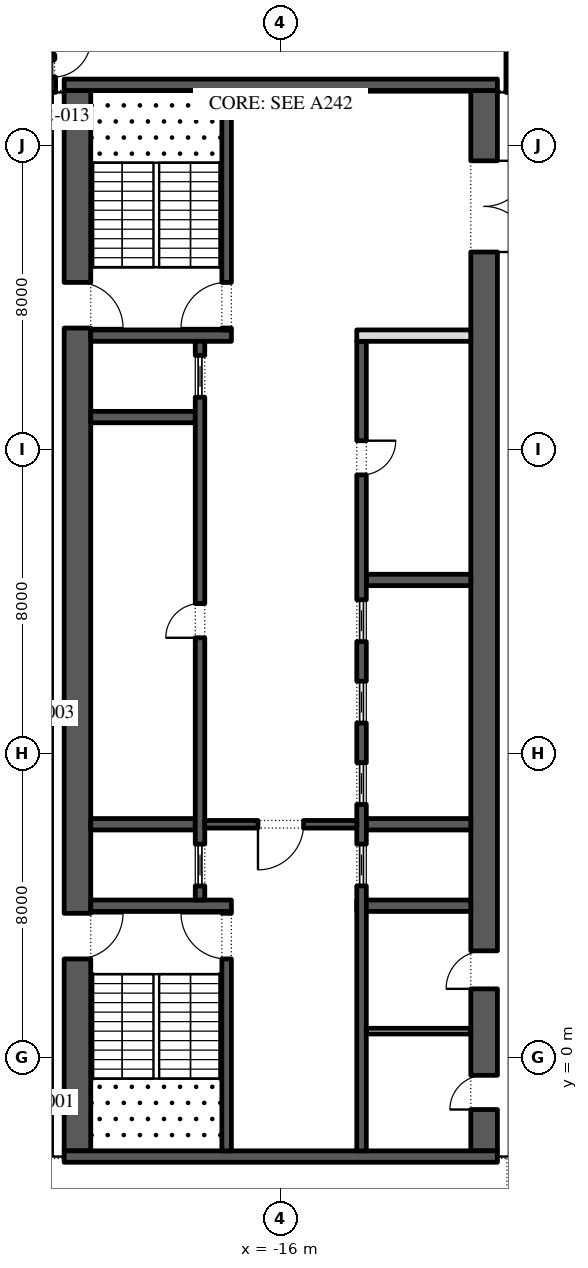
"""IFC4 building model, lengths in metres.
Left out: names, types, materials, properties, quantities, classifications, styles, units other than length and angle.
Written with IfcOpenShell. Run it as: python <this file> out.ifc"""

import sys

from ifc_helpers import new_model, si_unit, direction, frame, frame_2d, origin, place, context, subcontext, project, spatial, rectangle, extrude, element, fill, save


model = new_model("IFC4")
c1 = context("Model", 3, precision=1e-05, world=origin(), true_north=direction((0.0, 1.0)))
c2 = subcontext(c1, "Body", "Model", "MODEL_VIEW")
j1 = project(units=[si_unit("LENGTHUNIT", "METRE"), si_unit("PLANEANGLEUNIT", "RADIAN")], contexts=[c1])
p1 = place(None, origin())
s1 = spatial("IfcSite", under=j1, at=p1, CompositionType="ELEMENT")
p2 = place(p1, origin())
s2 = spatial("IfcBuilding", under=s1, at=p2, CompositionType="ELEMENT")
p3 = place(p2, frame((0.0, 0.0, 180.0)))
s3 = spatial("IfcBuildingStorey", under=s2, at=p3, CompositionType="ELEMENT", Elevation=180.0)
p4 = place(p3, frame((-33.157, 30.092, 0.0), z_axis=(0.0, 0.0, 1.0), x_axis=(0.224950279389, -0.974370243697, 0.0)))
e1 = element("IfcWall", 1, at=p4, inside=s3, PredefinedType="STANDARD", context=c2, shape_type="SweptSolid", body=[
    extrude(rectangle(XDim=49.5, YDim=0.3, at=frame_2d((24.75, 0.0))), origin(), (0.0, 0.0, 1.0), 4.0),
])
p5 = place(p4, frame((2.207, 0.0, 0.0)))
e2 = element("IfcOpeningElement", 2, at=p5, cuts=e1, PredefinedType="OPENING", context=c2, shape_type="SweptSolid", body=[
    extrude(rectangle(XDim=2.4, YDim=3.5, at=frame_2d((1.2, 1.75))), frame((0.0, 0.16, 0.0), z_axis=(0.0, -1.0, 0.0), x_axis=(1.0, 0.0, 0.0)), (0.0, 0.0, 1.0), 0.32),
])
p6 = place(p4, frame((8.121, 0.0, 0.45)))
e3 = element("IfcOpeningElement", 3, at=p6, cuts=e1, PredefinedType="OPENING", context=c2, shape_type="SweptSolid", body=[
    extrude(rectangle(XDim=4.5, YDim=2.825, at=frame_2d((2.25, 1.413))), frame((0.0, 0.16, 0.0), z_axis=(0.0, -1.0, 0.0), x_axis=(1.0, 0.0, 0.0)), (0.0, 0.0, 1.0), 0.32),
])
p7 = place(p4, frame((15.236, 0.0, 0.45)))
e4 = element("IfcOpeningElement", 4, at=p7, cuts=e1, PredefinedType="OPENING", context=c2, shape_type="SweptSolid", body=[
    extrude(rectangle(XDim=4.5, YDim=2.95, at=frame_2d((2.25, 1.475))), frame((0.0, 0.16, 0.0), z_axis=(0.0, -1.0, 0.0), x_axis=(1.0, 0.0, 0.0)), (0.0, 0.0, 1.0), 0.32),
])
p8 = place(p4, frame((22.35, 0.0, 0.45)))
e5 = element("IfcOpeningElement", 5, at=p8, cuts=e1, PredefinedType="OPENING", context=c2, shape_type="SweptSolid", body=[
    extrude(rectangle(XDim=4.5, YDim=3.0, at=frame_2d((2.25, 1.5))), frame((0.0, 0.16, 0.0), z_axis=(0.0, -1.0, 0.0), x_axis=(1.0, 0.0, 0.0)), (0.0, 0.0, 1.0), 0.32),
])
p9 = place(p4, frame((30.514, 0.0, 0.0)))
e6 = element("IfcOpeningElement", 6, at=p9, cuts=e1, PredefinedType="OPENING", context=c2, shape_type="SweptSolid", body=[
    extrude(rectangle(XDim=2.4, YDim=3.5, at=frame_2d((1.2, 1.75))), frame((0.0, 0.16, 0.0), z_axis=(0.0, -1.0, 0.0), x_axis=(1.0, 0.0, 0.0)), (0.0, 0.0, 1.0), 0.32),
])
p10 = place(p4, frame((36.579, 0.0, 0.45)))
e7 = element("IfcOpeningElement", 7, at=p10, cuts=e1, PredefinedType="OPENING", context=c2, shape_type="SweptSolid", body=[
    extrude(rectangle(XDim=4.5, YDim=3.05, at=frame_2d((2.25, 1.525))), frame((0.0, 0.16, 0.0), z_axis=(0.0, -1.0, 0.0), x_axis=(1.0, 0.0, 0.0)), (0.0, 0.0, 1.0), 0.32),
])
p11 = place(p4, frame((43.693, 0.0, 0.45)))
e8 = element("IfcOpeningElement", 8, at=p11, cuts=e1, PredefinedType="OPENING", context=c2, shape_type="SweptSolid", body=[
    extrude(rectangle(XDim=4.5, YDim=3.05, at=frame_2d((2.25, 1.525))), frame((0.0, 0.16, 0.0), z_axis=(0.0, -1.0, 0.0), x_axis=(1.0, 0.0, 0.0)), (0.0, 0.0, 1.0), 0.32),
])
p12 = place(p3, frame((-21.35, -2.45, 0.0), z_axis=(0.0, 0.0, 1.0), x_axis=(0.0, 1.0, 0.0)))
e9 = element("IfcWall", 9, at=p12, inside=s3, PredefinedType="SHEAR", context=c2, shape_type="SweptSolid", body=[
    extrude(rectangle(XDim=27.9, YDim=0.7, at=frame_2d((13.95, 0.0))), origin(), (0.0, 0.0, 1.0), 4.0),
])
p13 = place(p12, frame((5.05, 0.0, 0.0)))
e10 = element("IfcOpeningElement", 10, at=p13, cuts=e9, PredefinedType="OPENING", context=c2, shape_type="SweptSolid", body=[
    extrude(rectangle(XDim=1.2, YDim=2.1, at=frame_2d((0.6, 1.05))), frame((0.0, 0.36, 0.0), z_axis=(0.0, -1.0, 0.0), x_axis=(1.0, 0.0, 0.0)), (0.0, 0.0, 1.0), 0.72),
])
p14 = place(p12, frame((21.65, 0.0, 0.0)))
e11 = element("IfcOpeningElement", 11, at=p14, cuts=e9, PredefinedType="OPENING", context=c2, shape_type="SweptSolid", body=[
    extrude(rectangle(XDim=1.2, YDim=2.1, at=frame_2d((0.6, 1.05))), frame((0.0, 0.36, 0.0), z_axis=(0.0, -1.0, 0.0), x_axis=(1.0, 0.0, 0.0)), (0.0, 0.0, 1.0), 0.72),
])
p15 = place(p3, frame((-10.65, -2.45, 0.0), z_axis=(0.0, 0.0, 1.0), x_axis=(0.0, 1.0, 0.0)))
e12 = element("IfcWall", 12, at=p15, inside=s3, PredefinedType="SHEAR", context=c2, shape_type="SweptSolid", body=[
    extrude(rectangle(XDim=27.9, YDim=0.7, at=frame_2d((13.95, 0.0))), origin(), (0.0, 0.0, 1.0), 4.0),
])
p16 = place(p15, frame((23.65, 0.0, 0.0)))
e13 = element("IfcOpeningElement", 13, at=p16, cuts=e12, PredefinedType="OPENING", context=c2, shape_type="SweptSolid", body=[
    extrude(rectangle(XDim=2.4, YDim=2.1, at=frame_2d((1.2, 1.05))), frame((0.0, 0.36, 0.0), z_axis=(0.0, -1.0, 0.0), x_axis=(1.0, 0.0, 0.0)), (0.0, 0.0, 1.0), 0.72),
])
p17 = place(p15, frame((1.087, 0.0, 0.0)))
e14 = element("IfcOpeningElement", 14, at=p17, cuts=e12, PredefinedType="OPENING", context=c2, shape_type="SweptSolid", body=[
    extrude(rectangle(XDim=0.9, YDim=2.1, at=frame_2d((0.45, 1.05))), frame((0.0, 0.36, 0.0), z_axis=(0.0, -1.0, 0.0), x_axis=(1.0, 0.0, 0.0)), (0.0, 0.0, 1.0), 0.72),
])
p18 = place(p15, frame((4.262, 0.0, 0.0)))
e15 = element("IfcOpeningElement", 15, at=p18, cuts=e12, PredefinedType="OPENING", context=c2, shape_type="SweptSolid", body=[
    extrude(rectangle(XDim=1.0, YDim=2.1, at=frame_2d((0.5, 1.05))), frame((0.0, 0.36, 0.0), z_axis=(0.0, -1.0, 0.0), x_axis=(1.0, 0.0, 0.0)), (0.0, 0.0, 1.0), 0.72),
])
for number, where, z_axis, x_axis in (
    (16, (-21.7, -2.6, 0.0), (0.0, 0.0, 1.0), (1.0, 0.0, 0.0)),
    (17, (-21.7, 25.6, 0.0), (0.0, 0.0, 1.0), (1.0, 0.0, 0.0)),
):
    element("IfcWall", number, at=place(p3, frame(where, z_axis=z_axis, x_axis=x_axis)), inside=s3, PredefinedType="SHEAR", context=c2, shape_type="SweptSolid", body=[
        extrude(rectangle(XDim=11.4, YDim=0.3, at=frame_2d((5.7, 0.0))), origin(), (0.0, 0.0, 1.0), 4.0),
    ])
p19 = place(p3, frame((-21.0, 4.0, 0.0), z_axis=(0.0, 0.0, 1.0), x_axis=(1.0, 0.0, 0.0)))
e18 = element("IfcWall", 18, at=p19, inside=s3, PredefinedType="SHEAR", context=c2, shape_type="SweptSolid", body=[
    extrude(rectangle(XDim=3.7, YDim=0.3, at=frame_2d((1.85, 0.0))), origin(), (0.0, 0.0, 1.0), 4.0),
])
p20 = place(p3, frame((-17.425, -2.45, 0.0), z_axis=(0.0, 0.0, 1.0), x_axis=(0.0, 1.0, 0.0)))
e19 = element("IfcWall", 19, at=p20, inside=s3, PredefinedType="SHEAR", context=c2, shape_type="SweptSolid", body=[
    extrude(rectangle(XDim=6.3, YDim=0.25, at=frame_2d((3.15, 0.0))), origin(), (0.0, 0.0, 1.0), 4.0),
])
p21 = place(p20, frame((5.05, 0.0, 0.0)))
e20 = element("IfcOpeningElement", 20, at=p21, cuts=e19, PredefinedType="OPENING", context=c2, shape_type="SweptSolid", body=[
    extrude(rectangle(XDim=1.2, YDim=2.1, at=frame_2d((0.6, 1.05))), frame((0.0, 0.135, 0.0), z_axis=(0.0, -1.0, 0.0), x_axis=(1.0, 0.0, 0.0)), (0.0, 0.0, 1.0), 0.27),
])
p22 = place(p3, frame((-21.0, 19.0, 0.0), z_axis=(0.0, 0.0, 1.0), x_axis=(1.0, 0.0, 0.0)))
e21 = element("IfcWall", 21, at=p22, inside=s3, PredefinedType="SHEAR", context=c2, shape_type="SweptSolid", body=[
    extrude(rectangle(XDim=3.7, YDim=0.3, at=frame_2d((1.85, 0.0))), origin(), (0.0, 0.0, 1.0), 4.0),
])
p23 = place(p3, frame((-17.425, 19.15, 0.0), z_axis=(0.0, 0.0, 1.0), x_axis=(0.0, 1.0, 0.0)))
e22 = element("IfcWall", 22, at=p23, inside=s3, PredefinedType="SHEAR", context=c2, shape_type="SweptSolid", body=[
    extrude(rectangle(XDim=6.3, YDim=0.25, at=frame_2d((3.15, 0.0))), origin(), (0.0, 0.0, 1.0), 4.0),
])
p24 = place(p23, frame((0.05, 0.0, 0.0)))
e23 = element("IfcOpeningElement", 23, at=p24, cuts=e22, PredefinedType="OPENING", context=c2, shape_type="SweptSolid", body=[
    extrude(rectangle(XDim=1.2, YDim=2.1, at=frame_2d((0.6, 1.05))), frame((0.0, 0.135, 0.0), z_axis=(0.0, -1.0, 0.0), x_axis=(1.0, 0.0, 0.0)), (0.0, 0.0, 1.0), 0.27),
])
for number, where, z_axis, x_axis in (
    (24, (-21.0, 6.143, 0.0), (0.0, 0.0, 1.0), (1.0, 0.0, 0.0)),
    (25, (-21.0, 16.857, 0.0), (0.0, 0.0, 1.0), (1.0, 0.0, 0.0)),
):
    element("IfcWall", number, at=place(p3, frame(where, z_axis=z_axis, x_axis=x_axis)), inside=s3, PredefinedType="SHEAR", context=c2, shape_type="SweptSolid", body=[
        extrude(rectangle(XDim=2.75, YDim=0.3, at=frame_2d((1.375, 0.0))), origin(), (0.0, 0.0, 1.0), 4.0),
    ])
p25 = place(p3, frame((-18.125, 4.15, 0.0), z_axis=(0.0, 0.0, 1.0), x_axis=(0.0, 1.0, 0.0)))
e26 = element("IfcWall", 26, at=p25, inside=s3, PredefinedType="SHEAR", context=c2, shape_type="SweptSolid", body=[
    extrude(rectangle(XDim=14.7, YDim=0.25, at=frame_2d((7.35, 0.0))), origin(), (0.0, 0.0, 1.0), 4.0),
])
p26 = place(p25, frame((6.9, 0.0, 0.0)))
e27 = element("IfcOpeningElement", 27, at=p26, cuts=e26, PredefinedType="OPENING", context=c2, shape_type="SweptSolid", body=[
    extrude(rectangle(XDim=0.9, YDim=2.1, at=frame_2d((0.45, 1.05))), frame((0.0, 0.135, 0.0), z_axis=(0.0, -1.0, 0.0), x_axis=(1.0, 0.0, 0.0)), (0.0, 0.0, 1.0), 0.27),
])
p27 = place(p25, frame((0.371, 0.0, 0.0)))
e28 = element("IfcOpeningElement", 28, at=p27, cuts=e26, PredefinedType="OPENING", context=c2, shape_type="SweptSolid", body=[
    extrude(rectangle(XDim=1.1, YDim=2.1, at=frame_2d((0.55, 1.05))), frame((0.0, 0.135, 0.0), z_axis=(0.0, -1.0, 0.0), x_axis=(1.0, 0.0, 0.0)), (0.0, 0.0, 1.0), 0.27),
])
p28 = place(p25, frame((13.229, 0.0, 0.0)))
e29 = element("IfcOpeningElement", 29, at=p28, cuts=e26, PredefinedType="OPENING", context=c2, shape_type="SweptSolid", body=[
    extrude(rectangle(XDim=1.1, YDim=2.1, at=frame_2d((0.55, 1.05))), frame((0.0, 0.135, 0.0), z_axis=(0.0, -1.0, 0.0), x_axis=(1.0, 0.0, 0.0)), (0.0, 0.0, 1.0), 0.27),
])
p29 = place(p3, frame((-14.0, 4.0, 0.0), z_axis=(0.0, 0.0, 1.0), x_axis=(1.0, 0.0, 0.0)))
e30 = element("IfcWall", 30, at=p29, inside=s3, PredefinedType="SHEAR", context=c2, shape_type="SweptSolid", body=[
    extrude(rectangle(XDim=3.0, YDim=0.3, at=frame_2d((1.5, 0.0))), origin(), (0.0, 0.0, 1.0), 4.0),
])
for number, where, z_axis, x_axis in (
    (31, (-13.75, 6.143, 0.0), (0.0, 0.0, 1.0), (1.0, 0.0, 0.0)),
    (32, (-13.75, 12.571, 0.0), (0.0, 0.0, 1.0), (1.0, 0.0, 0.0)),
):
    element("IfcWall", number, at=place(p3, frame(where, z_axis=z_axis, x_axis=x_axis)), inside=s3, PredefinedType="SHEAR", context=c2, shape_type="SweptSolid", body=[
        extrude(rectangle(XDim=2.75, YDim=0.3, at=frame_2d((1.375, 0.0))), origin(), (0.0, 0.0, 1.0), 4.0),
    ])
p30 = place(p3, frame((-13.875, -2.45, 0.0), z_axis=(0.0, 0.0, 1.0), x_axis=(0.0, 1.0, 0.0)))
e33 = element("IfcWall", 33, at=p30, inside=s3, PredefinedType="SHEAR", context=c2, shape_type="SweptSolid", body=[
    extrude(rectangle(XDim=21.3, YDim=0.25, at=frame_2d((10.65, 0.0))), origin(), (0.0, 0.0, 1.0), 4.0),
])
p31 = place(p30, frame((17.786, 0.0, 0.0)))
e34 = element("IfcOpeningElement", 34, at=p31, cuts=e33, PredefinedType="OPENING", context=c2, shape_type="SweptSolid", body=[
    extrude(rectangle(XDim=0.9, YDim=2.1, at=frame_2d((0.45, 1.05))), frame((0.0, 0.135, 0.0), z_axis=(0.0, -1.0, 0.0), x_axis=(1.0, 0.0, 0.0)), (0.0, 0.0, 1.0), 0.27),
])
p32 = place(p30, frame((6.971, 0.0, 0.0)))
e35 = element("IfcOpeningElement", 35, at=p32, cuts=e33, PredefinedType="OPENING", context=c2, shape_type="SweptSolid", body=[
    extrude(rectangle(XDim=1.1, YDim=2.1, at=frame_2d((0.55, 1.05))), frame((0.0, 0.135, 0.0), z_axis=(0.0, -1.0, 0.0), x_axis=(1.0, 0.0, 0.0)), (0.0, 0.0, 1.0), 0.27),
])
p33 = place(p30, frame((9.114, 0.0, 0.0)))
e36 = element("IfcOpeningElement", 36, at=p33, cuts=e33, PredefinedType="OPENING", context=c2, shape_type="SweptSolid", body=[
    extrude(rectangle(XDim=1.1, YDim=2.1, at=frame_2d((0.55, 1.05))), frame((0.0, 0.135, 0.0), z_axis=(0.0, -1.0, 0.0), x_axis=(1.0, 0.0, 0.0)), (0.0, 0.0, 1.0), 0.27),
])
p34 = place(p30, frame((11.257, 0.0, 0.0)))
e37 = element("IfcOpeningElement", 37, at=p34, cuts=e33, PredefinedType="OPENING", context=c2, shape_type="SweptSolid", body=[
    extrude(rectangle(XDim=1.1, YDim=2.1, at=frame_2d((0.55, 1.05))), frame((0.0, 0.135, 0.0), z_axis=(0.0, -1.0, 0.0), x_axis=(1.0, 0.0, 0.0)), (0.0, 0.0, 1.0), 0.27),
])
p35 = place(p30, frame((13.4, 0.0, 0.0)))
e38 = element("IfcOpeningElement", 38, at=p35, cuts=e33, PredefinedType="OPENING", context=c2, shape_type="SweptSolid", body=[
    extrude(rectangle(XDim=1.1, YDim=2.1, at=frame_2d((0.55, 1.05))), frame((0.0, 0.135, 0.0), z_axis=(0.0, -1.0, 0.0), x_axis=(1.0, 0.0, 0.0)), (0.0, 0.0, 1.0), 0.27),
])
p36 = place(p3, frame((-14.0, 19.0, 0.0), z_axis=(0.0, 0.0, 1.0), x_axis=(1.0, 0.0, 0.0)))
e39 = element("IfcWall", 39, at=p36, inside=s3, PredefinedType="PARTITIONING", context=c2, shape_type="SweptSolid", body=[
    extrude(rectangle(XDim=3.0, YDim=0.3, at=frame_2d((1.5, 0.0))), origin(), (0.0, 0.0, 1.0), 4.0),
])
p37 = place(p3, frame((-18.0, 6.143, 0.0), z_axis=(0.0, 0.0, 1.0), x_axis=(1.0, 0.0, 0.0)))
e40 = element("IfcWall", 40, at=p37, inside=s3, PredefinedType="SHEAR", context=c2, shape_type="SweptSolid", body=[
    extrude(rectangle(XDim=4.0, YDim=0.2, at=frame_2d((2.0, 0.0))), origin(), (0.0, 0.0, 1.0), 4.0),
])
p38 = place(p37, frame((1.4, 0.0, 0.0)))
e41 = element("IfcOpeningElement", 41, at=p38, cuts=e40, PredefinedType="OPENING", context=c2, shape_type="SweptSolid", body=[
    extrude(rectangle(XDim=1.2, YDim=2.1, at=frame_2d((0.6, 1.05))), frame((0.0, 0.11, 0.0), z_axis=(0.0, -1.0, 0.0), x_axis=(1.0, 0.0, 0.0)), (0.0, 0.0, 1.0), 0.22),
])
p39 = place(p3, frame((-13.75, 0.7, 0.0), z_axis=(0.0, 0.0, 1.0), x_axis=(1.0, 0.0, 0.0)))
e42 = element("IfcWall", 42, at=p39, inside=s3, PredefinedType="PARTITIONING", context=c2, shape_type="SweptSolid", body=[
    extrude(rectangle(XDim=2.75, YDim=0.15, at=frame_2d((1.375, 0.0))), origin(), (0.0, 0.0, 1.0), 4.0),
])
p40 = place(p3, frame((-22.0, 27.325, 0.0), z_axis=(0.0, 0.0, 1.0), x_axis=(0.0, -1.0, 0.0)))
e43 = element("IfcWall", 43, at=p40, inside=s3, PredefinedType="PARTITIONING", context=c2, shape_type="SweptSolid", body=[
    extrude(rectangle(XDim=1.925, YDim=0.15, at=frame_2d((0.962, 0.0))), origin(), (0.0, 0.0, 1.0), 4.0),
])
p41 = place(p40, frame((0.525, 0.0, 0.0)))
e44 = element("IfcOpeningElement", 44, at=p41, cuts=e43, PredefinedType="OPENING", context=c2, shape_type="SweptSolid", body=[
    extrude(rectangle(XDim=1.0, YDim=2.1, at=frame_2d((0.5, 1.05))), frame((0.0, 0.085, 0.0), z_axis=(0.0, -1.0, 0.0), x_axis=(1.0, 0.0, 0.0)), (0.0, 0.0, 1.0), 0.17),
])
p42 = place(p3, frame((-10.0, 25.4, 0.0), z_axis=(0.0, 0.0, 1.0), x_axis=(0.0, 1.0, 0.0)))
e45 = element("IfcWall", 45, at=p42, inside=s3, PredefinedType="PARTITIONING", context=c2, shape_type="SweptSolid", body=[
    extrude(rectangle(XDim=2.0, YDim=0.15, at=frame_2d((1.0, 0.0))), origin(), (0.0, 0.0, 1.0), 4.0),
])
p43 = place(p26, origin())
e46 = element("IfcDoor", 46, at=p43, inside=s3, OperationType="SINGLE_SWING_RIGHT", PredefinedType="DOOR", context=c2, shape_type="SweptSolid", body=[
    extrude(rectangle(XDim=0.9, YDim=2.1, at=frame_2d((0.45, 1.05))), frame((0.0, 0.125, 0.0), z_axis=(0.0, -1.0, 0.0), x_axis=(1.0, 0.0, 0.0)), (0.0, 0.0, 1.0), 0.05),
])
fill(e27, e46)
p44 = place(p27, origin())
e47 = element("IfcDoor", 47, at=p44, inside=s3, OperationType="SLIDING_TO_LEFT", PredefinedType="DOOR", context=c2, shape_type="SweptSolid", body=[
    extrude(rectangle(XDim=1.1, YDim=2.1, at=frame_2d((0.55, 1.05))), frame((0.0, 0.025, 0.0), z_axis=(0.0, -1.0, 0.0), x_axis=(1.0, 0.0, 0.0)), (0.0, 0.0, 1.0), 0.05),
])
fill(e28, e47)
p45 = place(p28, origin())
e48 = element("IfcDoor", 48, at=p45, inside=s3, OperationType="SLIDING_TO_LEFT", PredefinedType="DOOR", context=c2, shape_type="SweptSolid", body=[
    extrude(rectangle(XDim=1.1, YDim=2.1, at=frame_2d((0.55, 1.05))), frame((0.0, 0.025, 0.0), z_axis=(0.0, -1.0, 0.0), x_axis=(1.0, 0.0, 0.0)), (0.0, 0.0, 1.0), 0.05),
])
fill(e29, e48)
p46 = place(p31, frame((0.9, -0.2, 0.0), z_axis=(0.0, 0.0, 1.0), x_axis=(-1.0, 0.0, 0.0)))
e49 = element("IfcDoor", 49, at=p46, inside=s3, OperationType="SINGLE_SWING_RIGHT", PredefinedType="DOOR", context=c2, shape_type="SweptSolid", body=[
    extrude(rectangle(XDim=0.9, YDim=2.1, at=frame_2d((0.45, 1.05))), frame((0.0, -0.075, 0.0), z_axis=(0.0, -1.0, 0.0), x_axis=(1.0, 0.0, 0.0)), (0.0, 0.0, 1.0), 0.05),
])
fill(e34, e49)
p47 = place(p32, origin())
e50 = element("IfcDoor", 50, at=p47, inside=s3, OperationType="SLIDING_TO_LEFT", PredefinedType="DOOR", context=c2, shape_type="SweptSolid", body=[
    extrude(rectangle(XDim=1.1, YDim=2.1, at=frame_2d((0.55, 1.05))), frame((0.0, 0.025, 0.0), z_axis=(0.0, -1.0, 0.0), x_axis=(1.0, 0.0, 0.0)), (0.0, 0.0, 1.0), 0.05),
])
fill(e35, e50)
p48 = place(p33, origin())
e51 = element("IfcDoor", 51, at=p48, inside=s3, OperationType="SLIDING_TO_LEFT", PredefinedType="DOOR", context=c2, shape_type="SweptSolid", body=[
    extrude(rectangle(XDim=1.1, YDim=2.1, at=frame_2d((0.55, 1.05))), frame((0.0, 0.025, 0.0), z_axis=(0.0, -1.0, 0.0), x_axis=(1.0, 0.0, 0.0)), (0.0, 0.0, 1.0), 0.05),
])
fill(e36, e51)
p49 = place(p34, origin())
e52 = element("IfcDoor", 52, at=p49, inside=s3, OperationType="SLIDING_TO_LEFT", PredefinedType="DOOR", context=c2, shape_type="SweptSolid", body=[
    extrude(rectangle(XDim=1.1, YDim=2.1, at=frame_2d((0.55, 1.05))), frame((0.0, 0.025, 0.0), z_axis=(0.0, -1.0, 0.0), x_axis=(1.0, 0.0, 0.0)), (0.0, 0.0, 1.0), 0.05),
])
fill(e37, e52)
p50 = place(p35, origin())
e53 = element("IfcDoor", 53, at=p50, inside=s3, OperationType="SLIDING_TO_LEFT", PredefinedType="DOOR", context=c2, shape_type="SweptSolid", body=[
    extrude(rectangle(XDim=1.1, YDim=2.1, at=frame_2d((0.55, 1.05))), frame((0.0, 0.025, 0.0), z_axis=(0.0, -1.0, 0.0), x_axis=(1.0, 0.0, 0.0)), (0.0, 0.0, 1.0), 0.05),
])
fill(e38, e53)
p51 = place(p38, frame((1.2, 0.0, 0.0), z_axis=(0.0, 0.0, 1.0), x_axis=(-1.0, 0.0, 0.0)))
e54 = element("IfcDoor", 54, at=p51, inside=s3, OperationType="SINGLE_SWING_LEFT", PredefinedType="DOOR", context=c2, shape_type="SweptSolid", body=[
    extrude(rectangle(XDim=1.2, YDim=2.1, at=frame_2d((0.6, 1.05))), frame((0.0, 0.025, 0.0), z_axis=(0.0, -1.0, 0.0), x_axis=(1.0, 0.0, 0.0)), (0.0, 0.0, 1.0), 0.05),
])
fill(e41, e54)
p52 = place(p16, frame((2.4, 0.0, 0.0), z_axis=(0.0, 0.0, 1.0), x_axis=(-1.0, 0.0, 0.0)))
e55 = element("IfcDoor", 55, at=p52, inside=s3, OperationType="DOUBLE_DOOR_SINGLE_SWING", PredefinedType="DOOR", context=c2, shape_type="SweptSolid", body=[
    extrude(rectangle(XDim=2.4, YDim=2.1, at=frame_2d((1.2, 1.05))), frame((0.0, 0.025, 0.0), z_axis=(0.0, -1.0, 0.0), x_axis=(1.0, 0.0, 0.0)), (0.0, 0.0, 1.0), 0.05),
])
fill(e13, e55)
p53 = place(p21, origin())
e56 = element("IfcDoor", 56, at=p53, inside=s3, OperationType="SINGLE_SWING_LEFT", PredefinedType="DOOR", context=c2, shape_type="SweptSolid", body=[
    extrude(rectangle(XDim=1.2, YDim=2.1, at=frame_2d((0.6, 1.05))), frame((0.0, 0.025, 0.0), z_axis=(0.0, -1.0, 0.0), x_axis=(1.0, 0.0, 0.0)), (0.0, 0.0, 1.0), 0.05),
])
fill(e20, e56)
p54 = place(p13, frame((1.2, 0.0, 0.0), z_axis=(0.0, 0.0, 1.0), x_axis=(-1.0, 0.0, 0.0)))
e57 = element("IfcDoor", 57, at=p54, inside=s3, OperationType="SINGLE_SWING_RIGHT", PredefinedType="DOOR", context=c2, shape_type="SweptSolid", body=[
    extrude(rectangle(XDim=1.2, YDim=2.1, at=frame_2d((0.6, 1.05))), frame((0.0, 0.025, 0.0), z_axis=(0.0, -1.0, 0.0), x_axis=(1.0, 0.0, 0.0)), (0.0, 0.0, 1.0), 0.05),
])
fill(e10, e57)
p55 = place(p24, origin())
e58 = element("IfcDoor", 58, at=p55, inside=s3, OperationType="SINGLE_SWING_RIGHT", PredefinedType="DOOR", context=c2, shape_type="SweptSolid", body=[
    extrude(rectangle(XDim=1.2, YDim=2.1, at=frame_2d((0.6, 1.05))), frame((0.0, 0.025, 0.0), z_axis=(0.0, -1.0, 0.0), x_axis=(1.0, 0.0, 0.0)), (0.0, 0.0, 1.0), 0.05),
])
fill(e23, e58)
p56 = place(p14, frame((1.2, 0.0, 0.0), z_axis=(0.0, 0.0, 1.0), x_axis=(-1.0, 0.0, 0.0)))
e59 = element("IfcDoor", 59, at=p56, inside=s3, OperationType="SINGLE_SWING_LEFT", PredefinedType="DOOR", context=c2, shape_type="SweptSolid", body=[
    extrude(rectangle(XDim=1.2, YDim=2.1, at=frame_2d((0.6, 1.05))), frame((0.0, 0.025, 0.0), z_axis=(0.0, -1.0, 0.0), x_axis=(1.0, 0.0, 0.0)), (0.0, 0.0, 1.0), 0.05),
])
fill(e11, e59)
p57 = place(p17, origin())
e60 = element("IfcDoor", 60, at=p57, inside=s3, OperationType="SINGLE_SWING_RIGHT", PredefinedType="DOOR", context=c2, shape_type="SweptSolid", body=[
    extrude(rectangle(XDim=0.9, YDim=2.1, at=frame_2d((0.45, 1.05))), frame((0.0, 0.35, 0.0), z_axis=(0.0, -1.0, 0.0), x_axis=(1.0, 0.0, 0.0)), (0.0, 0.0, 1.0), 0.05),
])
fill(e14, e60)
p58 = place(p18, origin())
e61 = element("IfcDoor", 61, at=p58, inside=s3, OperationType="SINGLE_SWING_RIGHT", PredefinedType="DOOR", context=c2, shape_type="SweptSolid", body=[
    extrude(rectangle(XDim=1.0, YDim=2.1, at=frame_2d((0.5, 1.05))), frame((0.0, 0.35, 0.0), z_axis=(0.0, -1.0, 0.0), x_axis=(1.0, 0.0, 0.0)), (0.0, 0.0, 1.0), 0.05),
])
fill(e15, e61)
p59 = place(p41, origin())
e62 = element("IfcDoor", 62, at=p59, inside=s3, OperationType="SINGLE_SWING_RIGHT", PredefinedType="DOOR", context=c2, shape_type="SweptSolid", body=[
    extrude(rectangle(XDim=1.0, YDim=2.1, at=frame_2d((0.5, 1.05))), frame((0.0, 0.025, 0.0), z_axis=(0.0, -1.0, 0.0), x_axis=(1.0, 0.0, 0.0)), (0.0, 0.0, 1.0), 0.05),
])
fill(e44, e62)
save(model, sys.argv[1])
